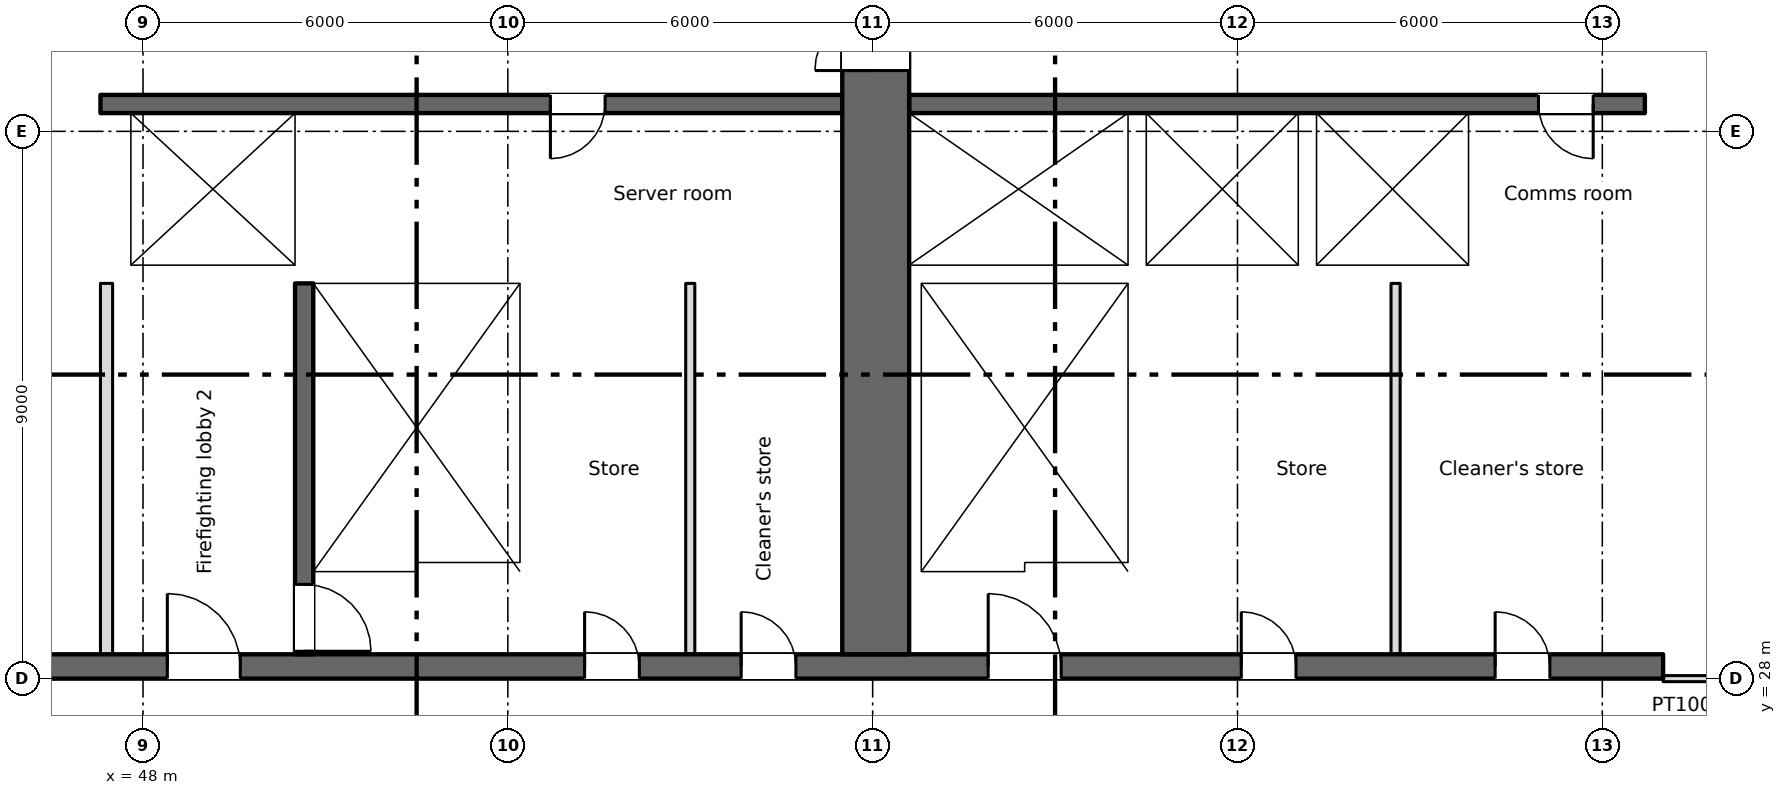
"""IFC4 building model, lengths in metres.
Left out: names, types, materials, properties, quantities, classifications, styles, units other than length and angle.
Written with IfcOpenShell. Run it as: python <this file> out.ifc"""

import sys

from ifc_helpers import new_model, si_unit, direction, frame, frame_2d, origin, place, context, subcontext, project, spatial, rectangle, extrude, element, fill, save


model = new_model("IFC4")
c1 = context("Model", 3, precision=1e-05, world=origin(), true_north=direction((0.0, 1.0)))
c2 = subcontext(c1, "Body", "Model", "MODEL_VIEW")
j1 = project(units=[si_unit("LENGTHUNIT", "METRE"), si_unit("PLANEANGLEUNIT", "RADIAN")], contexts=[c1])
p1 = place(None, origin())
s1 = spatial("IfcSite", under=j1, at=p1, CompositionType="ELEMENT")
p2 = place(p1, origin())
s2 = spatial("IfcBuilding", under=s1, at=p2, CompositionType="ELEMENT")
p3 = place(p2, frame((0.0, 0.0, 6.5)))
s3 = spatial("IfcBuildingStorey", under=s2, at=p3, CompositionType="ELEMENT", Elevation=6.5)
p4 = place(p3, frame((6.7, 28.2, 0.0), z_axis=(0.0, 0.0, 1.0), x_axis=(1.0, 0.0, 0.0)))
e1 = element("IfcWall", 1, at=p4, inside=s3, PredefinedType="SHEAR", context=c2, shape_type="SweptSolid", body=[
    extrude(rectangle(XDim=66.3, YDim=0.4, at=frame_2d((33.15, 0.0))), origin(), (0.0, 0.0, 1.0), 4.3),
])
p5 = place(p4, frame((13.85, 0.0, 0.0)))
e2 = element("IfcOpeningElement", 2, at=p5, cuts=e1, PredefinedType="OPENING", context=c2, shape_type="SweptSolid", body=[
    extrude(rectangle(XDim=0.9, YDim=2.1, at=frame_2d((0.45, 1.05))), frame((0.0, 0.21, 0.0), z_axis=(0.0, -1.0, 0.0), x_axis=(1.0, 0.0, 0.0)), (0.0, 0.0, 1.0), 0.42),
])
p6 = place(p4, frame((48.562, 0.0, 0.0)))
e3 = element("IfcOpeningElement", 3, at=p6, cuts=e1, PredefinedType="OPENING", context=c2, shape_type="SweptSolid", body=[
    extrude(rectangle(XDim=0.9, YDim=2.1, at=frame_2d((0.45, 1.05))), frame((0.0, 0.21, 0.0), z_axis=(0.0, -1.0, 0.0), x_axis=(1.0, 0.0, 0.0)), (0.0, 0.0, 1.0), 0.42),
])
p7 = place(p4, frame((51.137, 0.0, 0.0)))
e4 = element("IfcOpeningElement", 4, at=p7, cuts=e1, PredefinedType="OPENING", context=c2, shape_type="SweptSolid", body=[
    extrude(rectangle(XDim=0.9, YDim=2.1, at=frame_2d((0.45, 1.05))), frame((0.0, 0.21, 0.0), z_axis=(0.0, -1.0, 0.0), x_axis=(1.0, 0.0, 0.0)), (0.0, 0.0, 1.0), 0.42),
])
p8 = place(p4, frame((1.35, 0.0, 0.0)))
e5 = element("IfcOpeningElement", 5, at=p8, cuts=e1, PredefinedType="OPENING", context=c2, shape_type="SweptSolid", body=[
    extrude(rectangle(XDim=0.9, YDim=2.1, at=frame_2d((0.45, 1.05))), frame((0.0, 0.21, 0.0), z_axis=(0.0, -1.0, 0.0), x_axis=(1.0, 0.0, 0.0)), (0.0, 0.0, 1.0), 0.42),
])
p9 = place(p4, frame((59.363, 0.0, 0.0)))
e6 = element("IfcOpeningElement", 6, at=p9, cuts=e1, PredefinedType="OPENING", context=c2, shape_type="SweptSolid", body=[
    extrude(rectangle(XDim=0.9, YDim=2.1, at=frame_2d((0.45, 1.05))), frame((0.0, 0.21, 0.0), z_axis=(0.0, -1.0, 0.0), x_axis=(1.0, 0.0, 0.0)), (0.0, 0.0, 1.0), 0.42),
])
p10 = place(p4, frame((63.538, 0.0, 0.0)))
e7 = element("IfcOpeningElement", 7, at=p10, cuts=e1, PredefinedType="OPENING", context=c2, shape_type="SweptSolid", body=[
    extrude(rectangle(XDim=0.9, YDim=2.1, at=frame_2d((0.45, 1.05))), frame((0.0, 0.21, 0.0), z_axis=(0.0, -1.0, 0.0), x_axis=(1.0, 0.0, 0.0)), (0.0, 0.0, 1.0), 0.42),
])
p11 = place(p4, frame((4.7, 0.0, 0.0)))
e8 = element("IfcOpeningElement", 8, at=p11, cuts=e1, PredefinedType="OPENING", context=c2, shape_type="SweptSolid", body=[
    extrude(rectangle(XDim=1.2, YDim=2.1, at=frame_2d((0.6, 1.05))), frame((0.0, 0.21, 0.0), z_axis=(0.0, -1.0, 0.0), x_axis=(1.0, 0.0, 0.0)), (0.0, 0.0, 1.0), 0.42),
])
p12 = place(p4, frame((31.7, 0.0, 0.0)))
e9 = element("IfcOpeningElement", 9, at=p12, cuts=e1, PredefinedType="OPENING", context=c2, shape_type="SweptSolid", body=[
    extrude(rectangle(XDim=1.2, YDim=2.1, at=frame_2d((0.6, 1.05))), frame((0.0, 0.21, 0.0), z_axis=(0.0, -1.0, 0.0), x_axis=(1.0, 0.0, 0.0)), (0.0, 0.0, 1.0), 0.42),
])
p13 = place(p4, frame((55.2, 0.0, 0.0)))
e10 = element("IfcOpeningElement", 10, at=p13, cuts=e1, PredefinedType="OPENING", context=c2, shape_type="SweptSolid", body=[
    extrude(rectangle(XDim=1.2, YDim=2.1, at=frame_2d((0.6, 1.05))), frame((0.0, 0.21, 0.0), z_axis=(0.0, -1.0, 0.0), x_axis=(1.0, 0.0, 0.0)), (0.0, 0.0, 1.0), 0.42),
])
p14 = place(p4, frame((21.7, 0.0, 0.0)))
e11 = element("IfcOpeningElement", 11, at=p14, cuts=e1, PredefinedType="OPENING", context=c2, shape_type="SweptSolid", body=[
    extrude(rectangle(XDim=1.2, YDim=2.1, at=frame_2d((0.6, 1.05))), frame((0.0, 0.21, 0.0), z_axis=(0.0, -1.0, 0.0), x_axis=(1.0, 0.0, 0.0)), (0.0, 0.0, 1.0), 0.42),
])
p15 = place(p4, frame((41.7, 0.0, 0.0)))
e12 = element("IfcOpeningElement", 12, at=p15, cuts=e1, PredefinedType="OPENING", context=c2, shape_type="SweptSolid", body=[
    extrude(rectangle(XDim=1.2, YDim=2.1, at=frame_2d((0.6, 1.05))), frame((0.0, 0.21, 0.0), z_axis=(0.0, -1.0, 0.0), x_axis=(1.0, 0.0, 0.0)), (0.0, 0.0, 1.0), 0.42),
])
p16 = place(p4, frame((24.85, 0.0, 0.0)))
e13 = element("IfcOpeningElement", 13, at=p16, cuts=e1, PredefinedType="OPENING", context=c2, shape_type="SweptSolid", body=[
    extrude(rectangle(XDim=2.4, YDim=2.1, at=frame_2d((1.2, 1.05))), frame((0.0, 0.21, 0.0), z_axis=(0.0, -1.0, 0.0), x_axis=(1.0, 0.0, 0.0)), (0.0, 0.0, 1.0), 0.42),
])
p17 = place(p4, frame((37.35, 0.0, 0.0)))
e14 = element("IfcOpeningElement", 14, at=p17, cuts=e1, PredefinedType="OPENING", context=c2, shape_type="SweptSolid", body=[
    extrude(rectangle(XDim=2.4, YDim=2.1, at=frame_2d((1.2, 1.05))), frame((0.0, 0.21, 0.0), z_axis=(0.0, -1.0, 0.0), x_axis=(1.0, 0.0, 0.0)), (0.0, 0.0, 1.0), 0.42),
])
p18 = place(p4, frame((7.8, 0.0, 0.0)))
e15 = element("IfcOpeningElement", 15, at=p18, cuts=e1, PredefinedType="OPENING", context=c2, shape_type="SweptSolid", body=[
    extrude(rectangle(XDim=2.4, YDim=2.1, at=frame_2d((1.2, 1.05))), frame((0.0, 0.21, 0.0), z_axis=(0.0, -1.0, 0.0), x_axis=(1.0, 0.0, 0.0)), (0.0, 0.0, 1.0), 0.42),
])
p19 = place(p4, frame((28.85, 0.0, 0.0)))
e16 = element("IfcOpeningElement", 16, at=p19, cuts=e1, PredefinedType="OPENING", context=c2, shape_type="SweptSolid", body=[
    extrude(rectangle(XDim=0.9, YDim=2.1, at=frame_2d((0.45, 1.05))), frame((0.0, 0.21, 0.0), z_axis=(0.0, -1.0, 0.0), x_axis=(1.0, 0.0, 0.0)), (0.0, 0.0, 1.0), 0.42),
])
p20 = place(p4, frame((34.85, 0.0, 0.0)))
e17 = element("IfcOpeningElement", 17, at=p20, cuts=e1, PredefinedType="OPENING", context=c2, shape_type="SweptSolid", body=[
    extrude(rectangle(XDim=0.9, YDim=2.1, at=frame_2d((0.45, 1.05))), frame((0.0, 0.21, 0.0), z_axis=(0.0, -1.0, 0.0), x_axis=(1.0, 0.0, 0.0)), (0.0, 0.0, 1.0), 0.42),
])
p21 = place(p3, frame((72.85, 28.4, 0.0), z_axis=(0.0, 0.0, 1.0), x_axis=(0.0, 1.0, 0.0)))
e18 = element("IfcWall", 18, at=p21, inside=s3, PredefinedType="SHEAR", context=c2, shape_type="SweptSolid", body=[
    extrude(rectangle(XDim=12.85, YDim=0.3, at=frame_2d((6.425, 0.0))), origin(), (0.0, 0.0, 1.0), 4.3),
])
p22 = place(p3, frame((64.35, 34.8, 0.0), z_axis=(0.0, 0.0, 1.0), x_axis=(0.0, 1.0, 0.0)))
e19 = element("IfcWall", 19, at=p22, inside=s3, PredefinedType="SHEAR", context=c2, shape_type="SweptSolid", body=[
    extrude(rectangle(XDim=2.5, YDim=0.3, at=frame_2d((1.25, 0.0))), origin(), (0.0, 0.0, 1.0), 4.3),
])
p23 = place(p3, frame((60.05, 28.4, 0.0), z_axis=(0.0, 0.0, 1.0), x_axis=(0.0, 1.0, 0.0)))
e20 = element("IfcWall", 20, at=p23, inside=s3, PredefinedType="SHEAR", context=c2, shape_type="SweptSolid", body=[
    extrude(rectangle(XDim=16.5, YDim=1.1, at=frame_2d((8.25, 0.0))), origin(), (0.0, 0.0, 1.0), 4.3),
])
p24 = place(p23, frame((9.6, 0.0, 0.0)))
e21 = element("IfcOpeningElement", 21, at=p24, cuts=e20, PredefinedType="OPENING", context=c2, shape_type="SweptSolid", body=[
    extrude(rectangle(XDim=2.0, YDim=2.1, at=frame_2d((1.0, 1.05))), frame((0.0, 0.56, 0.0), z_axis=(0.0, -1.0, 0.0), x_axis=(1.0, 0.0, 0.0)), (0.0, 0.0, 1.0), 1.12),
])
p25 = place(p23, frame((15.2, 0.0, 0.0)))
e22 = element("IfcOpeningElement", 22, at=p25, cuts=e20, PredefinedType="OPENING", context=c2, shape_type="SweptSolid", body=[
    extrude(rectangle(XDim=1.2, YDim=2.1, at=frame_2d((0.6, 1.05))), frame((0.0, 0.56, 0.0), z_axis=(0.0, -1.0, 0.0), x_axis=(1.0, 0.0, 0.0)), (0.0, 0.0, 1.0), 1.12),
])
p26 = place(p3, frame((50.65, 34.5, 0.0), z_axis=(0.0, 0.0, 1.0), x_axis=(0.0, -1.0, 0.0)))
e23 = element("IfcWall", 23, at=p26, inside=s3, PredefinedType="SHEAR", context=c2, shape_type="SweptSolid", body=[
    extrude(rectangle(XDim=6.1, YDim=0.3, at=frame_2d((3.05, 0.0))), origin(), (0.0, 0.0, 1.0), 4.3),
])
p27 = place(p26, frame((4.95, 0.0, 0.0)))
e24 = element("IfcOpeningElement", 24, at=p27, cuts=e23, PredefinedType="OPENING", context=c2, shape_type="SweptSolid", body=[
    extrude(rectangle(XDim=1.1, YDim=2.1, at=frame_2d((0.55, 1.05))), frame((0.0, 0.16, 0.0), z_axis=(0.0, -1.0, 0.0), x_axis=(1.0, 0.0, 0.0)), (0.0, 0.0, 1.0), 0.32),
])
p28 = place(p3, frame((54.35, 28.4, 0.0), z_axis=(0.0, 0.0, 1.0), x_axis=(0.0, 1.0, 0.0)))
e25 = element("IfcWall", 25, at=p28, inside=s3, PredefinedType="SHEAR", context=c2, shape_type="SweptSolid", body=[
    extrude(rectangle(XDim=6.1, YDim=0.3, at=frame_2d((3.05, 0.0))), origin(), (0.0, 0.0, 1.0), 4.3),
])
p29 = place(p3, frame((60.7, 28.4, 0.0), z_axis=(0.0, 0.0, 1.0), x_axis=(0.0, 1.0, 0.0)))
e26 = element("IfcWall", 26, at=p29, inside=s3, PredefinedType="SHEAR", context=c2, shape_type="SweptSolid", body=[
    extrude(rectangle(XDim=6.1, YDim=0.2, at=frame_2d((3.05, 0.0))), origin(), (0.0, 0.0, 1.0), 4.3),
])
p30 = place(p3, frame((64.35, 28.4, 0.0), z_axis=(0.0, 0.0, 1.0), x_axis=(0.0, 1.0, 0.0)))
e27 = element("IfcWall", 27, at=p30, inside=s3, PredefinedType="SHEAR", context=c2, shape_type="SweptSolid", body=[
    extrude(rectangle(XDim=6.1, YDim=0.3, at=frame_2d((3.05, 0.0))), origin(), (0.0, 0.0, 1.0), 4.3),
])
p31 = place(p3, frame((47.3, 34.65, 0.0), z_axis=(0.0, 0.0, 1.0), x_axis=(1.0, 0.0, 0.0)))
e28 = element("IfcWall", 28, at=p31, inside=s3, PredefinedType="SHEAR", context=c2, shape_type="SweptSolid", body=[
    extrude(rectangle(XDim=12.2, YDim=0.3, at=frame_2d((6.1, 0.0))), origin(), (0.0, 0.0, 1.0), 4.3),
])
p32 = place(p31, frame((1.3, 0.0, 0.0)))
e29 = element("IfcOpeningElement", 29, at=p32, cuts=e28, PredefinedType="OPENING", context=c2, shape_type="SweptSolid", body=[
    extrude(rectangle(XDim=1.1, YDim=2.1, at=frame_2d((0.55, 1.05))), frame((0.0, 0.16, 0.0), z_axis=(0.0, -1.0, 0.0), x_axis=(1.0, 0.0, 0.0)), (0.0, 0.0, 1.0), 0.32),
])
p33 = place(p3, frame((60.6, 34.65, 0.0), z_axis=(0.0, 0.0, 1.0), x_axis=(1.0, 0.0, 0.0)))
e30 = element("IfcWall", 30, at=p33, inside=s3, PredefinedType="SHEAR", context=c2, shape_type="SweptSolid", body=[
    extrude(rectangle(XDim=12.1, YDim=0.3, at=frame_2d((6.05, 0.0))), origin(), (0.0, 0.0, 1.0), 4.3),
])
p34 = place(p3, frame((59.5, 37.45, 0.0), z_axis=(0.0, 0.0, 1.0), x_axis=(-1.0, 0.0, 0.0)))
e31 = element("IfcWall", 31, at=p34, inside=s3, PredefinedType="SHEAR", context=c2, shape_type="SweptSolid", body=[
    extrude(rectangle(XDim=12.2, YDim=0.3, at=frame_2d((6.1, 0.0))), origin(), (0.0, 0.0, 1.0), 4.3),
])
p35 = place(p34, frame((3.9, 0.0, 0.0)))
e32 = element("IfcOpeningElement", 32, at=p35, cuts=e31, PredefinedType="OPENING", context=c2, shape_type="SweptSolid", body=[
    extrude(rectangle(XDim=0.9, YDim=2.1, at=frame_2d((0.45, 1.05))), frame((0.0, 0.16, 0.0), z_axis=(0.0, -1.0, 0.0), x_axis=(1.0, 0.0, 0.0)), (0.0, 0.0, 1.0), 0.32),
])
p36 = place(p3, frame((72.7, 37.45, 0.0), z_axis=(0.0, 0.0, 1.0), x_axis=(-1.0, 0.0, 0.0)))
e33 = element("IfcWall", 33, at=p36, inside=s3, PredefinedType="SHEAR", context=c2, shape_type="SweptSolid", body=[
    extrude(rectangle(XDim=12.1, YDim=0.3, at=frame_2d((6.05, 0.0))), origin(), (0.0, 0.0, 1.0), 4.3),
])
p37 = place(p36, frame((0.85, 0.0, 0.0)))
e34 = element("IfcOpeningElement", 34, at=p37, cuts=e33, PredefinedType="OPENING", context=c2, shape_type="SweptSolid", body=[
    extrude(rectangle(XDim=0.9, YDim=2.1, at=frame_2d((0.45, 1.05))), frame((0.0, 0.16, 0.0), z_axis=(0.0, -1.0, 0.0), x_axis=(1.0, 0.0, 0.0)), (0.0, 0.0, 1.0), 0.32),
])
p38 = place(p36, frame((9.75, 0.0, 0.0)))
e35 = element("IfcOpeningElement", 35, at=p38, cuts=e33, PredefinedType="OPENING", context=c2, shape_type="SweptSolid", body=[
    extrude(rectangle(XDim=1.1, YDim=2.1, at=frame_2d((0.55, 1.05))), frame((0.0, 0.16, 0.0), z_axis=(0.0, -1.0, 0.0), x_axis=(1.0, 0.0, 0.0)), (0.0, 0.0, 1.0), 0.32),
])
p39 = place(p36, frame((6.4, 0.0, 0.0)))
e36 = element("IfcOpeningElement", 36, at=p39, cuts=e33, PredefinedType="OPENING", context=c2, shape_type="SweptSolid", body=[
    extrude(rectangle(XDim=1.1, YDim=2.1, at=frame_2d((0.55, 1.05))), frame((0.0, 0.16, 0.0), z_axis=(0.0, -1.0, 0.0), x_axis=(1.0, 0.0, 0.0)), (0.0, 0.0, 1.0), 0.32),
])
p40 = place(p36, frame((3.6, 0.0, 0.0)))
e37 = element("IfcOpeningElement", 37, at=p40, cuts=e33, PredefinedType="OPENING", context=c2, shape_type="SweptSolid", body=[
    extrude(rectangle(XDim=1.1, YDim=2.1, at=frame_2d((0.55, 1.05))), frame((0.0, 0.16, 0.0), z_axis=(0.0, -1.0, 0.0), x_axis=(1.0, 0.0, 0.0)), (0.0, 0.0, 1.0), 0.32),
])
p41 = place(p3, frame((47.55, 34.8, 0.0), z_axis=(0.0, 0.0, 1.0), x_axis=(0.0, 1.0, 0.0)))
e38 = element("IfcWall", 38, at=p41, inside=s3, PredefinedType="SHEAR", context=c2, shape_type="SweptSolid", body=[
    extrude(rectangle(XDim=2.5, YDim=0.5, at=frame_2d((1.25, 0.0))), origin(), (0.0, 0.0, 1.0), 4.3),
])
for number, where, z_axis, x_axis in (
    (39, (50.65, 34.8, 0.0), (0.0, 0.0, 1.0), (0.0, 1.0, 0.0)),
    (40, (67.15, 34.8, 0.0), (0.0, 0.0, 1.0), (0.0, 1.0, 0.0)),
    (41, (69.95, 34.8, 0.0), (0.0, 0.0, 1.0), (0.0, 1.0, 0.0)),
):
    element("IfcWall", number, at=place(p3, frame(where, z_axis=z_axis, x_axis=x_axis)), inside=s3, PredefinedType="SHEAR", context=c2, shape_type="SweptSolid", body=[
        extrude(rectangle(XDim=2.5, YDim=0.3, at=frame_2d((1.25, 0.0))), origin(), (0.0, 0.0, 1.0), 4.3),
    ])
p42 = place(p3, frame((47.4, 28.4, 0.0), z_axis=(0.0, 0.0, 1.0), x_axis=(0.0, 1.0, 0.0)))
e42 = element("IfcWall", 42, at=p42, inside=s3, PredefinedType="PARTITIONING", context=c2, shape_type="SweptSolid", body=[
    extrude(rectangle(XDim=6.1, YDim=0.2, at=frame_2d((3.05, 0.0))), origin(), (0.0, 0.0, 1.0), 4.3),
])
for number, where, z_axis, x_axis in (
    (43, (57.0, 28.4, 0.0), (0.0, 0.0, 1.0), (0.0, 1.0, 0.0)),
    (44, (68.6, 28.4, 0.0), (0.0, 0.0, 1.0), (0.0, 1.0, 0.0)),
):
    element("IfcWall", number, at=place(p3, frame(where, z_axis=z_axis, x_axis=x_axis)), inside=s3, PredefinedType="PARTITIONING", context=c2, shape_type="SweptSolid", body=[
        extrude(rectangle(XDim=6.1, YDim=0.15, at=frame_2d((3.05, 0.0))), origin(), (0.0, 0.0, 1.0), 4.3),
    ])
p43 = place(p3, frame((73.0, 28.0, 0.0), z_axis=(0.0, 0.0, 1.0), x_axis=(1.0, 0.0, 0.0)))
e45 = element("IfcWall", 45, at=p43, inside=s3, PredefinedType="PARTITIONING", context=c2, shape_type="SweptSolid", body=[
    extrude(rectangle(XDim=4.2, YDim=0.1, at=frame_2d((2.1, 0.0))), origin(), (0.0, 0.0, 1.0), 4.3),
])
p44 = place(p43, frame((1.6, 0.0, 0.0)))
e46 = element("IfcOpeningElement", 46, at=p44, cuts=e45, PredefinedType="OPENING", context=c2, shape_type="SweptSolid", body=[
    extrude(rectangle(XDim=1.0, YDim=2.1, at=frame_2d((0.5, 1.05))), frame((0.0, 0.06, 0.0), z_axis=(0.0, -1.0, 0.0), x_axis=(1.0, 0.0, 0.0)), (0.0, 0.0, 1.0), 0.12),
])
p45 = place(p6, origin())
e47 = element("IfcDoor", 47, at=p45, inside=s3, OperationType="SINGLE_SWING_LEFT", PredefinedType="DOOR", context=c2, shape_type="SweptSolid", body=[
    extrude(rectangle(XDim=0.9, YDim=2.1, at=frame_2d((0.45, 1.05))), frame((0.0, 0.025, 0.0), z_axis=(0.0, -1.0, 0.0), x_axis=(1.0, 0.0, 0.0)), (0.0, 0.0, 1.0), 0.05),
])
fill(e3, e47)
p46 = place(p7, origin())
e48 = element("IfcDoor", 48, at=p46, inside=s3, OperationType="SINGLE_SWING_LEFT", PredefinedType="DOOR", context=c2, shape_type="SweptSolid", body=[
    extrude(rectangle(XDim=0.9, YDim=2.1, at=frame_2d((0.45, 1.05))), frame((0.0, 0.025, 0.0), z_axis=(0.0, -1.0, 0.0), x_axis=(1.0, 0.0, 0.0)), (0.0, 0.0, 1.0), 0.05),
])
fill(e4, e48)
p47 = place(p9, origin())
e49 = element("IfcDoor", 49, at=p47, inside=s3, OperationType="SINGLE_SWING_LEFT", PredefinedType="DOOR", context=c2, shape_type="SweptSolid", body=[
    extrude(rectangle(XDim=0.9, YDim=2.1, at=frame_2d((0.45, 1.05))), frame((0.0, 0.025, 0.0), z_axis=(0.0, -1.0, 0.0), x_axis=(1.0, 0.0, 0.0)), (0.0, 0.0, 1.0), 0.05),
])
fill(e6, e49)
p48 = place(p10, origin())
e50 = element("IfcDoor", 50, at=p48, inside=s3, OperationType="SINGLE_SWING_LEFT", PredefinedType="DOOR", context=c2, shape_type="SweptSolid", body=[
    extrude(rectangle(XDim=0.9, YDim=2.1, at=frame_2d((0.45, 1.05))), frame((0.0, 0.025, 0.0), z_axis=(0.0, -1.0, 0.0), x_axis=(1.0, 0.0, 0.0)), (0.0, 0.0, 1.0), 0.05),
])
fill(e7, e50)
p49 = place(p35, origin())
e51 = element("IfcDoor", 51, at=p49, inside=s3, OperationType="SINGLE_SWING_RIGHT", PredefinedType="DOOR", context=c2, shape_type="SweptSolid", body=[
    extrude(rectangle(XDim=0.9, YDim=2.1, at=frame_2d((0.45, 1.05))), frame((0.0, 0.025, 0.0), z_axis=(0.0, -1.0, 0.0), x_axis=(1.0, 0.0, 0.0)), (0.0, 0.0, 1.0), 0.05),
])
fill(e32, e51)
p50 = place(p37, origin())
e52 = element("IfcDoor", 52, at=p50, inside=s3, OperationType="SINGLE_SWING_LEFT", PredefinedType="DOOR", context=c2, shape_type="SweptSolid", body=[
    extrude(rectangle(XDim=0.9, YDim=2.1, at=frame_2d((0.45, 1.05))), frame((0.0, 0.025, 0.0), z_axis=(0.0, -1.0, 0.0), x_axis=(1.0, 0.0, 0.0)), (0.0, 0.0, 1.0), 0.05),
])
fill(e34, e52)
p51 = place(p38, origin())
e53 = element("IfcDoor", 53, at=p51, inside=s3, OperationType="SLIDING_TO_LEFT", PredefinedType="DOOR", context=c2, shape_type="SweptSolid", body=[
    extrude(rectangle(XDim=1.1, YDim=2.1, at=frame_2d((0.55, 1.05))), frame((0.0, 0.025, 0.0), z_axis=(0.0, -1.0, 0.0), x_axis=(1.0, 0.0, 0.0)), (0.0, 0.0, 1.0), 0.05),
])
fill(e35, e53)
p52 = place(p39, origin())
e54 = element("IfcDoor", 54, at=p52, inside=s3, OperationType="SLIDING_TO_LEFT", PredefinedType="DOOR", context=c2, shape_type="SweptSolid", body=[
    extrude(rectangle(XDim=1.1, YDim=2.1, at=frame_2d((0.55, 1.05))), frame((0.0, 0.025, 0.0), z_axis=(0.0, -1.0, 0.0), x_axis=(1.0, 0.0, 0.0)), (0.0, 0.0, 1.0), 0.05),
])
fill(e36, e54)
p53 = place(p40, origin())
e55 = element("IfcDoor", 55, at=p53, inside=s3, OperationType="SLIDING_TO_LEFT", PredefinedType="DOOR", context=c2, shape_type="SweptSolid", body=[
    extrude(rectangle(XDim=1.1, YDim=2.1, at=frame_2d((0.55, 1.05))), frame((0.0, 0.025, 0.0), z_axis=(0.0, -1.0, 0.0), x_axis=(1.0, 0.0, 0.0)), (0.0, 0.0, 1.0), 0.05),
])
fill(e37, e55)
p54 = place(p32, origin())
e56 = element("IfcDoor", 56, at=p54, inside=s3, OperationType="SLIDING_TO_LEFT", PredefinedType="DOOR", context=c2, shape_type="SweptSolid", body=[
    extrude(rectangle(XDim=1.1, YDim=2.1, at=frame_2d((0.55, 1.05))), frame((0.0, 0.025, 0.0), z_axis=(0.0, -1.0, 0.0), x_axis=(1.0, 0.0, 0.0)), (0.0, 0.0, 1.0), 0.05),
])
fill(e29, e56)
p55 = place(p27, origin())
e57 = element("IfcDoor", 57, at=p55, inside=s3, OperationType="SINGLE_SWING_RIGHT", PredefinedType="DOOR", context=c2, shape_type="SweptSolid", body=[
    extrude(rectangle(XDim=1.1, YDim=2.1, at=frame_2d((0.55, 1.05))), frame((0.0, 0.025, 0.0), z_axis=(0.0, -1.0, 0.0), x_axis=(1.0, 0.0, 0.0)), (0.0, 0.0, 1.0), 0.05),
])
fill(e24, e57)
p56 = place(p13, origin())
e58 = element("IfcDoor", 58, at=p56, inside=s3, OperationType="SINGLE_SWING_LEFT", PredefinedType="DOOR", context=c2, shape_type="SweptSolid", body=[
    extrude(rectangle(XDim=1.2, YDim=2.1, at=frame_2d((0.6, 1.05))), frame((0.0, 0.025, 0.0), z_axis=(0.0, -1.0, 0.0), x_axis=(1.0, 0.0, 0.0)), (0.0, 0.0, 1.0), 0.05),
])
fill(e10, e58)
p57 = place(p15, origin())
e59 = element("IfcDoor", 59, at=p57, inside=s3, OperationType="SINGLE_SWING_LEFT", PredefinedType="DOOR", context=c2, shape_type="SweptSolid", body=[
    extrude(rectangle(XDim=1.2, YDim=2.1, at=frame_2d((0.6, 1.05))), frame((0.0, 0.025, 0.0), z_axis=(0.0, -1.0, 0.0), x_axis=(1.0, 0.0, 0.0)), (0.0, 0.0, 1.0), 0.05),
])
fill(e12, e59)
p58 = place(p24, origin())
e60 = element("IfcDoor", 60, at=p58, inside=s3, OperationType="DOUBLE_DOOR_SINGLE_SWING", PredefinedType="DOOR", context=c2, shape_type="SweptSolid", body=[
    extrude(rectangle(XDim=2.0, YDim=2.1, at=frame_2d((1.0, 1.05))), frame((0.0, 0.025, 0.0), z_axis=(0.0, -1.0, 0.0), x_axis=(1.0, 0.0, 0.0)), (0.0, 0.0, 1.0), 0.05),
])
fill(e21, e60)
save(model, sys.argv[1])
